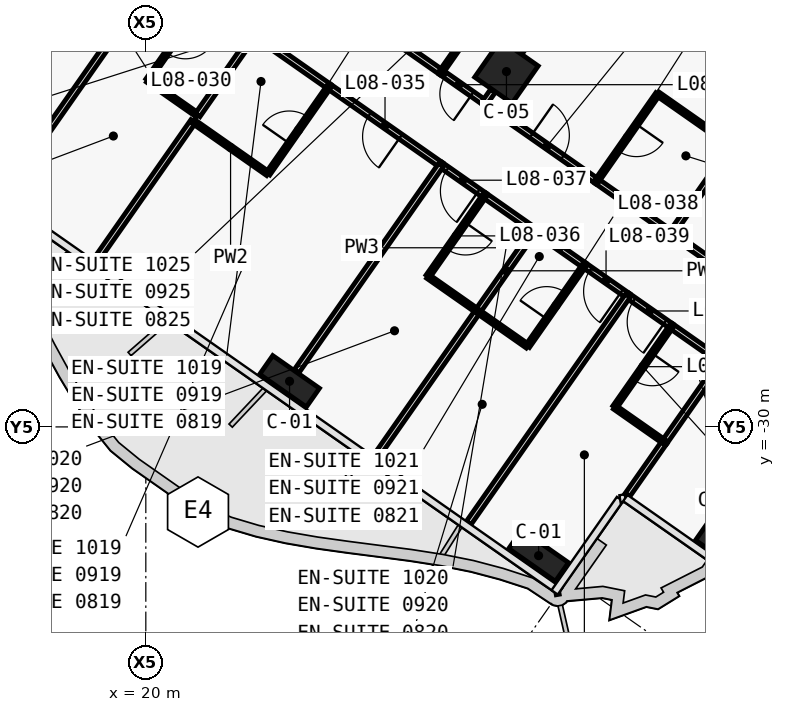
"""IFC4 building model, lengths in metres.
Left out: names, types, materials, properties, quantities, classifications, styles, units other than length and angle.
Written with IfcOpenShell. Run it as: python <this file> out.ifc"""

import sys

from ifc_helpers import new_model, si_unit, direction, frame, frame_2d, origin, origin_2d, place, context, subcontext, project, spatial, rectangle, extrude, element, fill, save


model = new_model("IFC4")
c1 = context("Model", 3, precision=1e-05, world=origin(), true_north=direction((0.0, 1.0)))
c2 = subcontext(c1, "Body", "Model", "MODEL_VIEW")
j1 = project(units=[si_unit("LENGTHUNIT", "METRE"), si_unit("PLANEANGLEUNIT", "RADIAN")], contexts=[c1])
p1 = place(None, origin())
s1 = spatial("IfcSite", under=j1, at=p1, CompositionType="ELEMENT")
p2 = place(p1, origin())
s2 = spatial("IfcBuilding", under=s1, at=p2, CompositionType="ELEMENT")
p3 = place(p2, frame((0.0, 0.0, 54.5)))
s3 = spatial("IfcBuildingStorey", under=s2, at=p3, CompositionType="ELEMENT", Elevation=54.5)
for number, where, z_axis, x_axis in (
    (1, (23.782, -28.799, 0.0), (0.0, 0.0, 1.0), (0.819, -0.574, 0.0)),
    (2, (30.336, -33.388, 0.0), (0.0, 0.0, 1.0), (0.819, -0.574, 0.0)),
    (3, (35.14, -32.541, 0.0), (0.0, 0.0, 1.0), (0.574, 0.819, 0.0)),
):
    element("IfcColumn", number, at=place(p3, frame(where, z_axis=z_axis, x_axis=x_axis)), inside=s3, PredefinedType="COLUMN", context=c2, shape_type="SweptSolid", body=[
        extrude(rectangle(XDim=1.5, YDim=0.6, at=origin_2d()), origin(), (0.0, 0.0, 1.0), 3.6),
    ])
p4 = place(p3, frame((29.49, -20.649, 0.0), z_axis=(0.0, 0.0, 1.0), x_axis=(0.819152044289, -0.573576436351, 0.0)))
e4 = element("IfcColumn", 4, at=p4, inside=s3, PredefinedType="COLUMN", context=c2, shape_type="SweptSolid", body=[
    extrude(rectangle(XDim=1.2, YDim=1.2, at=origin_2d()), origin(), (0.0, 0.0, 1.0), 3.6),
])
p5 = place(p3, frame((28.917, -21.469, 0.0), z_axis=(0.0, 0.0, 1.0), x_axis=(-0.81914197737, 0.573590813132, 0.0)))
e5 = element("IfcWall", 5, at=p5, inside=s3, PredefinedType="PARTITIONING", context=c2, shape_type="SweptSolid", body=[
    extrude(rectangle(XDim=1.403, YDim=0.15, at=frame_2d((0.701, 0.0))), origin(), (0.0, 0.0, 1.0), 2.6),
])
p6 = place(p5, frame((0.403, 0.0, 0.0)))
e6 = element("IfcOpeningElement", 6, at=p6, cuts=e5, PredefinedType="OPENING", context=c2, shape_type="SweptSolid", body=[
    extrude(rectangle(XDim=0.85, YDim=2.1, at=frame_2d((0.425, 1.05))), frame((0.0, 0.085, 0.0), z_axis=(0.0, -1.0, 0.0), x_axis=(1.0, 0.0, 0.0)), (0.0, 0.0, 1.0), 0.17),
])
p7 = place(p3, frame((26.457, -19.746, 0.0), z_axis=(0.0, 0.0, 1.0), x_axis=(0.819189013667, -0.573523634986, 0.0)))
e7 = element("IfcWall", 7, at=p7, inside=s3, PredefinedType="PARTITIONING", context=c2, shape_type="SweptSolid", body=[
    extrude(rectangle(XDim=1.604, YDim=0.15, at=frame_2d((0.802, 0.0))), origin(), (0.0, 0.0, 1.0), 3.32),
])
p8 = place(p3, frame((28.914, -21.467, 0.0), z_axis=(0.0, 0.0, 1.0), x_axis=(0.819145961204, -0.573585123798, 0.0)))
e8 = element("IfcWall", 8, at=p8, inside=s3, PredefinedType="PARTITIONING", context=c2, shape_type="SweptSolid", body=[
    extrude(rectangle(XDim=3.603, YDim=0.15, at=frame_2d((1.802, 0.0))), origin(), (0.0, 0.0, 1.0), 2.6),
])
p9 = place(p8, frame((1.502, 0.0, 0.0)))
e9 = element("IfcOpeningElement", 9, at=p9, cuts=e8, PredefinedType="OPENING", context=c2, shape_type="SweptSolid", body=[
    extrude(rectangle(XDim=1.0, YDim=2.1, at=frame_2d((0.5, 1.05))), frame((0.0, 0.085, 0.0), z_axis=(0.0, -1.0, 0.0), x_axis=(1.0, 0.0, 0.0)), (0.0, 0.0, 1.0), 0.17),
])
for number, where, z_axis, x_axis in (
    (10, (31.863, -23.531, 0.0), (0.0, 0.0, 1.0), (0.819, -0.574, 0.0)),
    (11, (33.829, -24.908, 0.0), (0.0, 0.0, 1.0), (0.819, -0.574, 0.0)),
):
    element("IfcWall", number, at=place(p3, frame(where, z_axis=z_axis, x_axis=x_axis)), inside=s3, PredefinedType="PARTITIONING", context=c2, shape_type="SweptSolid", body=[
        extrude(rectangle(XDim=2.404, YDim=0.15, at=frame_2d((1.202, 0.0))), origin(), (0.0, 0.0, 1.0), 3.32),
    ])
p10 = place(p3, frame((27.771, -23.107, 0.0), z_axis=(0.0, 0.0, 1.0), x_axis=(-0.819145961204, 0.573585123798, 0.0)))
e12 = element("IfcWall", 12, at=p10, inside=s3, PredefinedType="PARTITIONING", context=c2, shape_type="SweptSolid", body=[
    extrude(rectangle(XDim=3.603, YDim=0.15, at=frame_2d((1.802, 0.0))), origin(), (0.0, 0.0, 1.0), 2.6),
])
p11 = place(p10, frame((1.302, 0.0, 0.0)))
e13 = element("IfcOpeningElement", 13, at=p11, cuts=e12, PredefinedType="OPENING", context=c2, shape_type="SweptSolid", body=[
    extrude(rectangle(XDim=1.0, YDim=2.1, at=frame_2d((0.5, 1.05))), frame((0.0, 0.085, 0.0), z_axis=(0.0, -1.0, 0.0), x_axis=(1.0, 0.0, 0.0)), (0.0, 0.0, 1.0), 0.17),
])
p12 = place(p3, frame((24.821, -21.042, 0.0), z_axis=(0.0, 0.0, 1.0), x_axis=(-0.81911261637, 0.573632741136, 0.0)))
e14 = element("IfcWall", 14, at=p12, inside=s3, PredefinedType="PARTITIONING", context=c2, shape_type="SweptSolid", body=[
    extrude(rectangle(XDim=2.404, YDim=0.15, at=frame_2d((1.202, 0.0))), origin(), (0.0, 0.0, 1.0), 3.32),
])
p13 = place(p3, frame((28.917, -23.91, 0.0), z_axis=(0.0, 0.0, 1.0), x_axis=(-0.819117471667, 0.573625808005, 0.0)))
e15 = element("IfcWall", 15, at=p13, inside=s3, PredefinedType="PARTITIONING", context=c2, shape_type="SweptSolid", body=[
    extrude(rectangle(XDim=1.403, YDim=0.15, at=frame_2d((0.702, 0.0))), origin(), (0.0, 0.0, 1.0), 2.6),
])
p14 = place(p13, frame((0.201, 0.0, 0.0)))
e16 = element("IfcOpeningElement", 16, at=p14, cuts=e15, PredefinedType="OPENING", context=c2, shape_type="SweptSolid", body=[
    extrude(rectangle(XDim=1.0, YDim=2.1, at=frame_2d((0.5, 1.05))), frame((0.0, 0.085, 0.0), z_axis=(0.0, -1.0, 0.0), x_axis=(1.0, 0.0, 0.0)), (0.0, 0.0, 1.0), 0.17),
])
p15 = place(p3, frame((30.228, -24.828, 0.0), z_axis=(0.0, 0.0, 1.0), x_axis=(-0.819189013667, 0.573523634986, 0.0)))
e17 = element("IfcWall", 17, at=p15, inside=s3, PredefinedType="PARTITIONING", context=c2, shape_type="SweptSolid", body=[
    extrude(rectangle(XDim=1.604, YDim=0.15, at=frame_2d((0.802, 0.0))), origin(), (0.0, 0.0, 1.0), 3.32),
])
p16 = place(p3, frame((32.685, -26.549, 0.0), z_axis=(0.0, 0.0, 1.0), x_axis=(-0.819199220913, 0.573509055252, 0.0)))
e18 = element("IfcWall", 18, at=p16, inside=s3, PredefinedType="PARTITIONING", context=c2, shape_type="SweptSolid", body=[
    extrude(rectangle(XDim=1.403, YDim=0.15, at=frame_2d((0.702, 0.0))), origin(), (0.0, 0.0, 1.0), 3.32),
])
p17 = place(p16, frame((0.202, 0.0, 0.0)))
e19 = element("IfcOpeningElement", 19, at=p17, cuts=e18, PredefinedType="OPENING", context=c2, shape_type="SweptSolid", body=[
    extrude(rectangle(XDim=1.0, YDim=2.1, at=frame_2d((0.5, 1.05))), frame((0.0, 0.085, 0.0), z_axis=(0.0, -1.0, 0.0), x_axis=(1.0, 0.0, 0.0)), (0.0, 0.0, 1.0), 0.17),
])
p18 = place(p3, frame((31.539, -25.746, 0.0), z_axis=(0.0, 0.0, 1.0), x_axis=(-0.819117502046, 0.573625764625, 0.0)))
e20 = element("IfcWall", 20, at=p18, inside=s3, PredefinedType="PARTITIONING", context=c2, shape_type="SweptSolid", body=[
    extrude(rectangle(XDim=1.604, YDim=0.15, at=frame_2d((0.802, 0.0))), origin(), (0.0, 0.0, 1.0), 3.32),
])
p19 = place(p3, frame((33.831, -27.351, 0.0), z_axis=(0.0, 0.0, 1.0), x_axis=(-0.819117471667, 0.573625808005, 0.0)))
e21 = element("IfcWall", 21, at=p19, inside=s3, PredefinedType="PARTITIONING", context=c2, shape_type="SweptSolid", body=[
    extrude(rectangle(XDim=1.403, YDim=0.15, at=frame_2d((0.702, 0.0))), origin(), (0.0, 0.0, 1.0), 3.32),
])
p20 = place(p19, frame((0.201, 0.0, 0.0)))
e22 = element("IfcOpeningElement", 22, at=p20, cuts=e21, PredefinedType="OPENING", context=c2, shape_type="SweptSolid", body=[
    extrude(rectangle(XDim=1.0, YDim=2.1, at=frame_2d((0.5, 1.05))), frame((0.0, 0.085, 0.0), z_axis=(0.0, -1.0, 0.0), x_axis=(1.0, 0.0, 0.0)), (0.0, 0.0, 1.0), 0.17),
])
p21 = place(p3, frame((35.143, -28.27, 0.0), z_axis=(0.0, 0.0, 1.0), x_axis=(-0.819189013667, 0.573523634986, 0.0)))
e23 = element("IfcWall", 23, at=p21, inside=s3, PredefinedType="PARTITIONING", context=c2, shape_type="SweptSolid", body=[
    extrude(rectangle(XDim=1.604, YDim=0.15, at=frame_2d((0.802, 0.0))), origin(), (0.0, 0.0, 1.0), 3.32),
])
p22 = place(p3, frame((27.77, -20.666, 0.0), z_axis=(0.0, 0.0, 1.0), x_axis=(0.573537965655, 0.819178980414, 0.0)))
e24 = element("IfcWall", 24, at=p22, inside=s3, PredefinedType="PARTITIONING", context=c2, shape_type="SweptSolid", body=[
    extrude(rectangle(XDim=2.6, YDim=0.12, at=frame_2d((1.3, 0.0))), origin(), (0.0, 0.0, 1.0), 2.6),
])
p23 = place(p3, frame((35.013, -12.76, 0.0), z_axis=(0.0, 0.0, 1.0), x_axis=(-0.573558725113, -0.819164445546, 0.0)))
e25 = element("IfcWall", 25, at=p23, inside=s3, PredefinedType="PARTITIONING", context=c2, shape_type="SweptSolid", body=[
    extrude(rectangle(XDim=9.01, YDim=0.15, at=frame_2d((4.505, 0.0))), origin(), (0.0, 0.0, 1.0), 2.6),
])
p24 = place(p3, frame((29.134, -21.156, 0.0), z_axis=(0.0, 0.0, 1.0), x_axis=(-0.572944929411, -0.819593867633, 0.0)))
e26 = element("IfcWall", 26, at=p24, inside=s3, PredefinedType="PARTITIONING", context=c2, shape_type="SweptSolid", body=[
    extrude(rectangle(XDim=0.38, YDim=0.15, at=frame_2d((0.19, 0.0))), origin(), (0.0, 0.0, 1.0), 2.6),
])
p25 = place(p3, frame((35.438, -22.615, 0.0), z_axis=(0.0, 0.0, 1.0), x_axis=(-0.819141114317, 0.573592045652, 0.0)))
e27 = element("IfcWall", 27, at=p25, inside=s3, PredefinedType="PARTITIONING", context=c2, shape_type="SweptSolid", body=[
    extrude(rectangle(XDim=2.4, YDim=0.12, at=frame_2d((1.2, 0.0))), origin(), (0.0, 0.0, 1.0), 3.32),
])
p26 = place(p3, frame((33.47, -21.239, 0.0), z_axis=(0.0, 0.0, 1.0), x_axis=(-0.573550118428, -0.819170471667, 0.0)))
e28 = element("IfcWall", 28, at=p26, inside=s3, PredefinedType="PARTITIONING", context=c2, shape_type="SweptSolid", body=[
    extrude(rectangle(XDim=2.8, YDim=0.12, at=frame_2d((1.4, 0.0))), origin(), (0.0, 0.0, 1.0), 2.6),
])
p27 = place(p26, frame((0.975, 0.0, 0.0)))
e29 = element("IfcOpeningElement", 29, at=p27, cuts=e28, PredefinedType="OPENING", context=c2, shape_type="SweptSolid", body=[
    extrude(rectangle(XDim=0.85, YDim=2.05, at=frame_2d((0.425, 1.025))), frame((0.0, 0.07, 0.0), z_axis=(0.0, -1.0, 0.0), x_axis=(1.0, 0.0, 0.0)), (0.0, 0.0, 1.0), 0.14),
])
p28 = place(p3, frame((35.437, -22.616, 0.0), z_axis=(0.0, 0.0, 1.0), x_axis=(-0.573550118428, -0.819170471667, 0.0)))
e30 = element("IfcWall", 30, at=p28, inside=s3, PredefinedType="PARTITIONING", context=c2, shape_type="SweptSolid", body=[
    extrude(rectangle(XDim=2.8, YDim=0.15, at=frame_2d((1.4, 0.0))), origin(), (0.0, 0.0, 1.0), 2.6),
])
p29 = place(p3, frame((33.65, -30.397, 0.0), z_axis=(0.0, 0.0, 1.0), x_axis=(-0.573568305454, -0.819157737544, 0.0)))
e31 = element("IfcWall", 31, at=p29, inside=s3, PredefinedType="PARTITIONING", context=c2, shape_type="SweptSolid", body=[
    extrude(rectangle(XDim=1.701, YDim=0.15, at=frame_2d((0.851, 0.0))), origin(), (0.0, 0.0, 1.0), 3.32),
])
p30 = place(p3, frame((33.649, -30.4, 0.0), z_axis=(0.0, 0.0, 1.0), x_axis=(0.573544201094, 0.819174614714, 0.0)))
e32 = element("IfcWall", 32, at=p30, inside=s3, PredefinedType="PARTITIONING", context=c2, shape_type="SweptSolid", body=[
    extrude(rectangle(XDim=2.602, YDim=0.15, at=frame_2d((1.301, 0.0))), origin(), (0.0, 0.0, 1.0), 3.32),
])
p31 = place(p3, frame((20.396, -17.944, 0.0), z_axis=(0.0, 0.0, 1.0), x_axis=(-0.57359826181, -0.819136761505, 0.0)))
e33 = element("IfcWall", 33, at=p31, inside=s3, PredefinedType="PARTITIONING", context=c2, shape_type="SweptSolid", body=[
    extrude(rectangle(XDim=6.63, YDim=0.15, at=frame_2d((3.315, 0.0))), origin(), (0.0, 0.0, 1.0), 2.6),
])
p32 = place(p3, frame((21.542, -18.747, 0.0), z_axis=(0.0, 0.0, 1.0), x_axis=(-0.573645091666, -0.819103967032, 0.0)))
e34 = element("IfcWall", 34, at=p32, inside=s3, PredefinedType="PARTITIONING", context=c2, shape_type="SweptSolid", body=[
    extrude(rectangle(XDim=2.6, YDim=0.12, at=frame_2d((1.3, 0.0))), origin(), (0.0, 0.0, 1.0), 3.32),
])
p33 = place(p32, frame((0.875, 0.0, 0.0)))
e35 = element("IfcOpeningElement", 35, at=p33, cuts=e34, PredefinedType="OPENING", context=c2, shape_type="SweptSolid", body=[
    extrude(rectangle(XDim=0.85, YDim=2.05, at=frame_2d((0.425, 1.025))), frame((0.0, 0.07, 0.0), z_axis=(0.0, -1.0, 0.0), x_axis=(1.0, 0.0, 0.0)), (0.0, 0.0, 1.0), 0.14),
])
p34 = place(p3, frame((20.051, -20.878, 0.0), z_axis=(0.0, 0.0, 1.0), x_axis=(0.81918174131, -0.573534022273, 0.0)))
e36 = element("IfcWall", 36, at=p34, inside=s3, PredefinedType="PARTITIONING", context=c2, shape_type="SweptSolid", body=[
    extrude(rectangle(XDim=1.6, YDim=0.12, at=frame_2d((0.8, 0.0))), origin(), (0.0, 0.0, 1.0), 3.32),
])
p35 = place(p3, frame((21.248, -21.958, 0.0), z_axis=(0.0, 0.0, 1.0), x_axis=(-0.573556991349, -0.819165659482, 0.0)))
e37 = element("IfcWall", 37, at=p35, inside=s3, PredefinedType="PARTITIONING", context=c2, shape_type="SweptSolid", body=[
    extrude(rectangle(XDim=4.501, YDim=0.15, at=frame_2d((2.25, 0.0))), origin(), (0.0, 0.0, 1.0), 2.5),
])
p36 = place(p3, frame((22.854, -19.665, 0.0), z_axis=(0.0, 0.0, 1.0), x_axis=(-0.573582085028, -0.819148089014, 0.0)))
e38 = element("IfcWall", 38, at=p36, inside=s3, PredefinedType="PARTITIONING", context=c2, shape_type="SweptSolid", body=[
    extrude(rectangle(XDim=2.6, YDim=0.15, at=frame_2d((1.3, 0.0))), origin(), (0.0, 0.0, 1.0), 3.32),
])
p37 = place(p3, frame((21.247, -21.959, 0.0), z_axis=(0.0, 0.0, 1.0), x_axis=(0.819155442668, -0.573571582932, 0.0)))
e39 = element("IfcWall", 39, at=p37, inside=s3, PredefinedType="PARTITIONING", context=c2, shape_type="SweptSolid", body=[
    extrude(rectangle(XDim=2.4, YDim=0.12, at=frame_2d((1.2, 0.0))), origin(), (0.0, 0.0, 1.0), 3.32),
])
p38 = place(p3, frame((23.215, -23.335, 0.0), z_axis=(0.0, 0.0, 1.0), x_axis=(0.573591086599, 0.819141785879, 0.0)))
e40 = element("IfcWall", 40, at=p38, inside=s3, PredefinedType="PARTITIONING", context=c2, shape_type="SweptSolid", body=[
    extrude(rectangle(XDim=2.8, YDim=0.12, at=frame_2d((1.4, 0.0))), origin(), (0.0, 0.0, 1.0), 3.32),
])
p39 = place(p38, frame((0.975, 0.0, 0.0)))
e41 = element("IfcOpeningElement", 41, at=p39, cuts=e40, PredefinedType="OPENING", context=c2, shape_type="SweptSolid", body=[
    extrude(rectangle(XDim=0.85, YDim=2.05, at=frame_2d((0.425, 1.025))), frame((0.0, 0.07, 0.0), z_axis=(0.0, -1.0, 0.0), x_axis=(1.0, 0.0, 0.0)), (0.0, 0.0, 1.0), 0.14),
])
p40 = place(p3, frame((27.769, -23.106, 0.0), z_axis=(0.0, 0.0, 1.0), x_axis=(-0.57359826181, -0.819136761505, 0.0)))
e42 = element("IfcWall", 42, at=p40, inside=s3, PredefinedType="PARTITIONING", context=c2, shape_type="SweptSolid", body=[
    extrude(rectangle(XDim=6.63, YDim=0.15, at=frame_2d((3.315, 0.0))), origin(), (0.0, 0.0, 1.0), 2.6),
])
p41 = place(p3, frame((28.915, -23.909, 0.0), z_axis=(0.0, 0.0, 1.0), x_axis=(-0.573645091666, -0.819103967032, 0.0)))
e43 = element("IfcWall", 43, at=p41, inside=s3, PredefinedType="PARTITIONING", context=c2, shape_type="SweptSolid", body=[
    extrude(rectangle(XDim=2.6, YDim=0.12, at=frame_2d((1.3, 0.0))), origin(), (0.0, 0.0, 1.0), 3.32),
])
p42 = place(p41, frame((0.875, 0.0, 0.0)))
e44 = element("IfcOpeningElement", 44, at=p42, cuts=e43, PredefinedType="OPENING", context=c2, shape_type="SweptSolid", body=[
    extrude(rectangle(XDim=0.85, YDim=2.05, at=frame_2d((0.425, 1.025))), frame((0.0, 0.07, 0.0), z_axis=(0.0, -1.0, 0.0), x_axis=(1.0, 0.0, 0.0)), (0.0, 0.0, 1.0), 0.14),
])
p43 = place(p3, frame((27.424, -26.04, 0.0), z_axis=(0.0, 0.0, 1.0), x_axis=(0.81918174131, -0.573534022273, 0.0)))
e45 = element("IfcWall", 45, at=p43, inside=s3, PredefinedType="PARTITIONING", context=c2, shape_type="SweptSolid", body=[
    extrude(rectangle(XDim=1.6, YDim=0.12, at=frame_2d((0.8, 0.0))), origin(), (0.0, 0.0, 1.0), 3.32),
])
p44 = place(p3, frame((28.734, -26.958, 0.0), z_axis=(0.0, 0.0, 1.0), x_axis=(-0.573594842236, -0.819139156041, 0.0)))
e46 = element("IfcWall", 46, at=p44, inside=s3, PredefinedType="PARTITIONING", context=c2, shape_type="SweptSolid", body=[
    extrude(rectangle(XDim=4.699, YDim=0.15, at=frame_2d((2.35, 0.0))), origin(), (0.0, 0.0, 1.0), 2.5),
])
p45 = place(p3, frame((30.226, -24.827, 0.0), z_axis=(0.0, 0.0, 1.0), x_axis=(-0.573600972199, -0.819134863556, 0.0)))
e47 = element("IfcWall", 47, at=p45, inside=s3, PredefinedType="PARTITIONING", context=c2, shape_type="SweptSolid", body=[
    extrude(rectangle(XDim=2.6, YDim=0.15, at=frame_2d((1.3, 0.0))), origin(), (0.0, 0.0, 1.0), 3.32),
])
p46 = place(p3, frame((28.734, -26.958, 0.0), z_axis=(0.0, 0.0, 1.0), x_axis=(0.819131543282, -0.57360571371, 0.0)))
e48 = element("IfcWall", 48, at=p46, inside=s3, PredefinedType="PARTITIONING", context=c2, shape_type="SweptSolid", body=[
    extrude(rectangle(XDim=1.6, YDim=0.12, at=frame_2d((0.8, 0.0))), origin(), (0.0, 0.0, 1.0), 3.32),
])
p47 = place(p3, frame((30.046, -27.875, 0.0), z_axis=(0.0, 0.0, 1.0), x_axis=(0.573537965655, 0.819178980414, 0.0)))
e49 = element("IfcWall", 49, at=p47, inside=s3, PredefinedType="PARTITIONING", context=c2, shape_type="SweptSolid", body=[
    extrude(rectangle(XDim=2.6, YDim=0.12, at=frame_2d((1.3, 0.0))), origin(), (0.0, 0.0, 1.0), 3.32),
])
p48 = place(p47, frame((0.875, 0.0, 0.0)))
e50 = element("IfcOpeningElement", 50, at=p48, cuts=e49, PredefinedType="OPENING", context=c2, shape_type="SweptSolid", body=[
    extrude(rectangle(XDim=0.85, YDim=2.05, at=frame_2d((0.425, 1.025))), frame((0.0, 0.07, 0.0), z_axis=(0.0, -1.0, 0.0), x_axis=(1.0, 0.0, 0.0)), (0.0, 0.0, 1.0), 0.14),
])
p49 = place(p3, frame((32.684, -26.548, 0.0), z_axis=(0.0, 0.0, 1.0), x_axis=(-0.573556610931, -0.81916592584, 0.0)))
e51 = element("IfcWall", 51, at=p49, inside=s3, PredefinedType="PARTITIONING", context=c2, shape_type="SweptSolid", body=[
    extrude(rectangle(XDim=7.3, YDim=0.15, at=frame_2d((3.65, 0.0))), origin(), (0.0, 0.0, 1.0), 2.5),
])
p50 = place(p3, frame((33.83, -27.35, 0.0), z_axis=(0.0, 0.0, 1.0), x_axis=(-0.573537965655, -0.819178980414, 0.0)))
e52 = element("IfcWall", 52, at=p50, inside=s3, PredefinedType="PARTITIONING", context=c2, shape_type="SweptSolid", body=[
    extrude(rectangle(XDim=2.6, YDim=0.12, at=frame_2d((1.3, 0.0))), origin(), (0.0, 0.0, 1.0), 3.32),
])
p51 = place(p50, frame((0.875, 0.0, 0.0)))
e53 = element("IfcOpeningElement", 53, at=p51, cuts=e52, PredefinedType="OPENING", context=c2, shape_type="SweptSolid", body=[
    extrude(rectangle(XDim=0.85, YDim=2.05, at=frame_2d((0.425, 1.025))), frame((0.0, 0.07, 0.0), z_axis=(0.0, -1.0, 0.0), x_axis=(1.0, 0.0, 0.0)), (0.0, 0.0, 1.0), 0.14),
])
p52 = place(p3, frame((32.339, -29.481, 0.0), z_axis=(0.0, 0.0, 1.0), x_axis=(0.819131543282, -0.57360571371, 0.0)))
e54 = element("IfcWall", 54, at=p52, inside=s3, PredefinedType="PARTITIONING", context=c2, shape_type="SweptSolid", body=[
    extrude(rectangle(XDim=1.6, YDim=0.12, at=frame_2d((0.8, 0.0))), origin(), (0.0, 0.0, 1.0), 3.32),
])
p53 = place(p33, origin())
e55 = element("IfcDoor", 55, at=p53, inside=s3, OperationType="SINGLE_SWING_LEFT", PredefinedType="DOOR", context=c2, shape_type="SweptSolid", body=[
    extrude(rectangle(XDim=0.85, YDim=2.05, at=frame_2d((0.425, 1.025))), frame((0.0, 0.025, 0.0), z_axis=(0.0, -1.0, 0.0), x_axis=(1.0, 0.0, 0.0)), (0.0, 0.0, 1.0), 0.05),
])
fill(e35, e55)
p54 = place(p39, origin())
e56 = element("IfcDoor", 56, at=p54, inside=s3, OperationType="SINGLE_SWING_RIGHT", PredefinedType="DOOR", context=c2, shape_type="SweptSolid", body=[
    extrude(rectangle(XDim=0.85, YDim=2.05, at=frame_2d((0.425, 1.025))), frame((0.0, 0.025, 0.0), z_axis=(0.0, -1.0, 0.0), x_axis=(1.0, 0.0, 0.0)), (0.0, 0.0, 1.0), 0.05),
])
fill(e41, e56)
p55 = place(p11, origin())
e57 = element("IfcDoor", 57, at=p55, inside=s3, OperationType="SINGLE_SWING_LEFT", PredefinedType="DOOR", context=c2, shape_type="SweptSolid", body=[
    extrude(rectangle(XDim=1.0, YDim=2.1, at=frame_2d((0.5, 1.05))), frame((0.0, 0.025, 0.0), z_axis=(0.0, -1.0, 0.0), x_axis=(1.0, 0.0, 0.0)), (0.0, 0.0, 1.0), 0.05),
])
fill(e13, e57)
p56 = place(p42, origin())
e58 = element("IfcDoor", 58, at=p56, inside=s3, OperationType="SINGLE_SWING_LEFT", PredefinedType="DOOR", context=c2, shape_type="SweptSolid", body=[
    extrude(rectangle(XDim=0.85, YDim=2.05, at=frame_2d((0.425, 1.025))), frame((0.0, 0.025, 0.0), z_axis=(0.0, -1.0, 0.0), x_axis=(1.0, 0.0, 0.0)), (0.0, 0.0, 1.0), 0.05),
])
fill(e44, e58)
p57 = place(p14, origin())
e59 = element("IfcDoor", 59, at=p57, inside=s3, OperationType="SINGLE_SWING_RIGHT", PredefinedType="DOOR", context=c2, shape_type="SweptSolid", body=[
    extrude(rectangle(XDim=1.0, YDim=2.1, at=frame_2d((0.5, 1.05))), frame((0.0, 0.025, 0.0), z_axis=(0.0, -1.0, 0.0), x_axis=(1.0, 0.0, 0.0)), (0.0, 0.0, 1.0), 0.05),
])
fill(e16, e59)
p58 = place(p48, origin())
e60 = element("IfcDoor", 60, at=p58, inside=s3, OperationType="SINGLE_SWING_LEFT", PredefinedType="DOOR", context=c2, shape_type="SweptSolid", body=[
    extrude(rectangle(XDim=0.85, YDim=2.05, at=frame_2d((0.425, 1.025))), frame((0.0, 0.025, 0.0), z_axis=(0.0, -1.0, 0.0), x_axis=(1.0, 0.0, 0.0)), (0.0, 0.0, 1.0), 0.05),
])
fill(e50, e60)
p59 = place(p17, origin())
e61 = element("IfcDoor", 61, at=p59, inside=s3, OperationType="SINGLE_SWING_RIGHT", PredefinedType="DOOR", context=c2, shape_type="SweptSolid", body=[
    extrude(rectangle(XDim=1.0, YDim=2.1, at=frame_2d((0.5, 1.05))), frame((0.0, 0.025, 0.0), z_axis=(0.0, -1.0, 0.0), x_axis=(1.0, 0.0, 0.0)), (0.0, 0.0, 1.0), 0.05),
])
fill(e19, e61)
p60 = place(p51, origin())
e62 = element("IfcDoor", 62, at=p60, inside=s3, OperationType="SINGLE_SWING_LEFT", PredefinedType="DOOR", context=c2, shape_type="SweptSolid", body=[
    extrude(rectangle(XDim=0.85, YDim=2.05, at=frame_2d((0.425, 1.025))), frame((0.0, 0.025, 0.0), z_axis=(0.0, -1.0, 0.0), x_axis=(1.0, 0.0, 0.0)), (0.0, 0.0, 1.0), 0.05),
])
fill(e53, e62)
p61 = place(p20, origin())
e63 = element("IfcDoor", 63, at=p61, inside=s3, OperationType="SINGLE_SWING_RIGHT", PredefinedType="DOOR", context=c2, shape_type="SweptSolid", body=[
    extrude(rectangle(XDim=1.0, YDim=2.1, at=frame_2d((0.5, 1.05))), frame((0.0, 0.025, 0.0), z_axis=(0.0, -1.0, 0.0), x_axis=(1.0, 0.0, 0.0)), (0.0, 0.0, 1.0), 0.05),
])
fill(e22, e63)
p62 = place(p6, origin())
e64 = element("IfcDoor", 64, at=p62, inside=s3, OperationType="SINGLE_SWING_RIGHT", PredefinedType="DOOR", context=c2, shape_type="SweptSolid", body=[
    extrude(rectangle(XDim=0.85, YDim=2.1, at=frame_2d((0.425, 1.05))), frame((0.0, 0.025, 0.0), z_axis=(0.0, -1.0, 0.0), x_axis=(1.0, 0.0, 0.0)), (0.0, 0.0, 1.0), 0.05),
])
fill(e6, e64)
p63 = place(p27, origin())
e65 = element("IfcDoor", 65, at=p63, inside=s3, OperationType="SINGLE_SWING_LEFT", PredefinedType="DOOR", context=c2, shape_type="SweptSolid", body=[
    extrude(rectangle(XDim=0.85, YDim=2.05, at=frame_2d((0.425, 1.025))), frame((0.0, 0.025, 0.0), z_axis=(0.0, -1.0, 0.0), x_axis=(1.0, 0.0, 0.0)), (0.0, 0.0, 1.0), 0.05),
])
fill(e29, e65)
p64 = place(p9, origin())
e66 = element("IfcDoor", 66, at=p64, inside=s3, OperationType="SINGLE_SWING_RIGHT", PredefinedType="DOOR", context=c2, shape_type="SweptSolid", body=[
    extrude(rectangle(XDim=1.0, YDim=2.1, at=frame_2d((0.5, 1.05))), frame((0.0, 0.025, 0.0), z_axis=(0.0, -1.0, 0.0), x_axis=(1.0, 0.0, 0.0)), (0.0, 0.0, 1.0), 0.05),
])
fill(e9, e66)
save(model, sys.argv[1])
